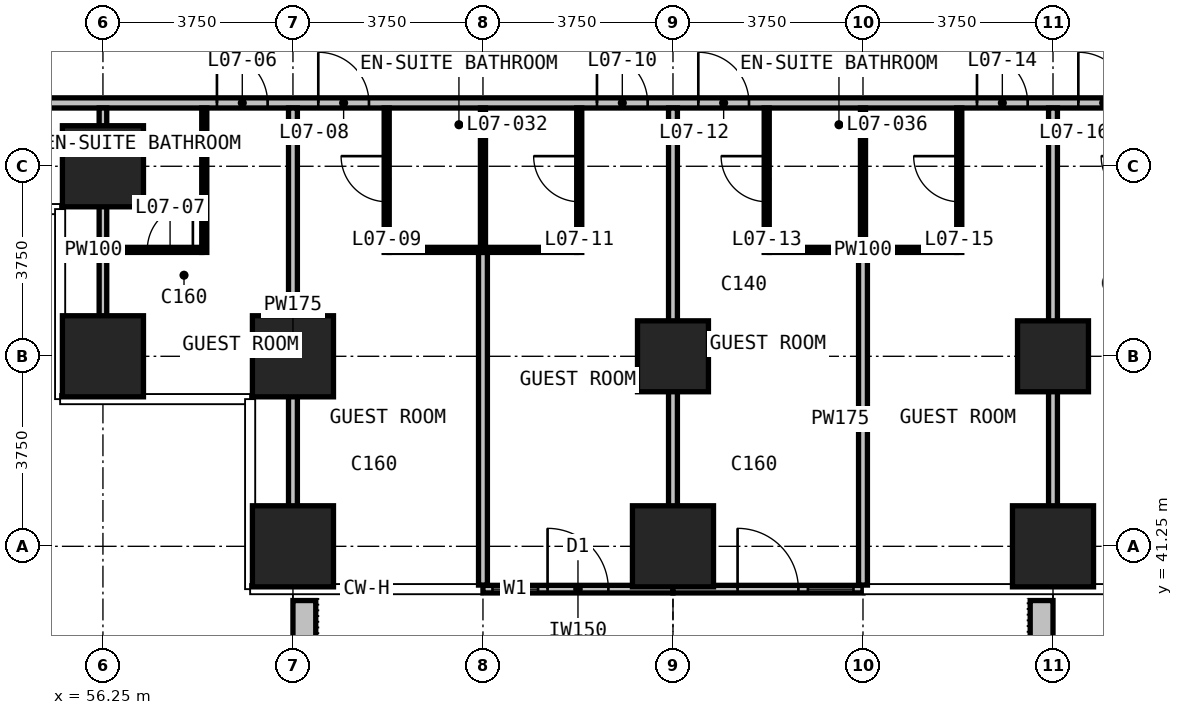
"""IFC4 building model, lengths in metres.
Left out: names, types, materials, properties, quantities, classifications, styles, units other than length and angle.
Written with IfcOpenShell. Run it as: python <this file> out.ifc"""

import sys

from ifc_helpers import new_model, si_unit, direction, frame, frame_2d, origin, origin_2d, place, context, subcontext, project, spatial, rectangle, extrude, element, fill, save


model = new_model("IFC4")
c1 = context("Model", 3, precision=1e-05, world=origin(), true_north=direction((0.0, 1.0)))
c2 = subcontext(c1, "Body", "Model", "MODEL_VIEW")
j1 = project(units=[si_unit("LENGTHUNIT", "METRE"), si_unit("PLANEANGLEUNIT", "RADIAN")], contexts=[c1])
p1 = place(None, origin())
s1 = spatial("IfcSite", under=j1, at=p1, CompositionType="ELEMENT")
p2 = place(p1, origin())
s2 = spatial("IfcBuilding", under=s1, at=p2, CompositionType="ELEMENT")
p3 = place(p2, frame((0.0, 0.0, 42.8)))
s3 = spatial("IfcBuildingStorey", under=s2, at=p3, CompositionType="ELEMENT", Elevation=42.8)
for number, where, z_axis, x_axis in (
    (1, (56.25, 45.0, 0.0), (0.0, 0.0, 1.0), (1.0, 0.0, 0.0)),
    (2, (56.25, 48.75, 0.0), (0.0, 0.0, 1.0), (1.0, 0.0, 0.0)),
    (3, (60.0, 41.25, 0.0), (0.0, 0.0, 1.0), (1.0, 0.0, 0.0)),
    (4, (60.0, 45.0, 0.0), (0.0, 0.0, 1.0), (1.0, 0.0, 0.0)),
    (5, (67.5, 41.25, 0.0), (0.0, 0.0, 1.0), (1.0, 0.0, 0.0)),
):
    element("IfcColumn", number, at=place(p3, frame(where, z_axis=z_axis, x_axis=x_axis)), inside=s3, PredefinedType="COLUMN", context=c2, shape_type="SweptSolid", body=[
        extrude(rectangle(XDim=1.6, YDim=1.6, at=origin_2d()), origin(), (0.0, 0.0, 1.0), 3.3),
    ])
p4 = place(p3, frame((67.5, 45.0, 0.0), z_axis=(0.0, 0.0, 1.0), x_axis=(1.0, 0.0, 0.0)))
e6 = element("IfcColumn", 6, at=p4, inside=s3, PredefinedType="COLUMN", context=c2, shape_type="SweptSolid", body=[
    extrude(rectangle(XDim=1.4, YDim=1.4, at=origin_2d()), origin(), (0.0, 0.0, 1.0), 3.3),
])
p5 = place(p3, frame((75.0, 41.25, 0.0), z_axis=(0.0, 0.0, 1.0), x_axis=(1.0, 0.0, 0.0)))
e7 = element("IfcColumn", 7, at=p5, inside=s3, PredefinedType="COLUMN", context=c2, shape_type="SweptSolid", body=[
    extrude(rectangle(XDim=1.6, YDim=1.6, at=origin_2d()), origin(), (0.0, 0.0, 1.0), 3.3),
])
p6 = place(p3, frame((75.0, 45.0, 0.0), z_axis=(0.0, 0.0, 1.0), x_axis=(1.0, 0.0, 0.0)))
e8 = element("IfcColumn", 8, at=p6, inside=s3, PredefinedType="COLUMN", context=c2, shape_type="SweptSolid", body=[
    extrude(rectangle(XDim=1.4, YDim=1.4, at=origin_2d()), origin(), (0.0, 0.0, 1.0), 3.3),
])
p7 = place(p3, frame((63.75, 40.405, 0.0), z_axis=(0.0, 0.0, 1.0), x_axis=(1.0, 0.0, 0.0)))
e9 = element("IfcWall", 9, at=p7, inside=s3, PredefinedType="SOLIDWALL", context=c2, shape_type="SweptSolid", body=[
    extrude(rectangle(XDim=3.75, YDim=0.15, at=frame_2d((1.875, 0.0))), origin(), (0.0, 0.0, 1.0), 3.0),
])
p8 = place(p7, frame((0.188, 0.0, 0.1)))
e10 = element("IfcOpeningElement", 10, at=p8, cuts=e9, PredefinedType="OPENING", context=c2, shape_type="SweptSolid", body=[
    extrude(rectangle(XDim=0.9, YDim=2.4, at=frame_2d((0.45, 1.2))), frame((0.0, 0.085, 0.0), z_axis=(0.0, -1.0, 0.0), x_axis=(1.0, 0.0, 0.0)), (0.0, 0.0, 1.0), 0.17),
])
p9 = place(p7, frame((1.275, 0.0, 0.0)))
e11 = element("IfcOpeningElement", 11, at=p9, cuts=e9, PredefinedType="OPENING", context=c2, shape_type="SweptSolid", body=[
    extrude(rectangle(XDim=1.2, YDim=2.4, at=frame_2d((0.6, 1.2))), frame((0.0, 0.085, 0.0), z_axis=(0.0, -1.0, 0.0), x_axis=(1.0, 0.0, 0.0)), (0.0, 0.0, 1.0), 0.17),
])
p10 = place(p3, frame((67.5, 40.405, 0.0), z_axis=(0.0, 0.0, 1.0), x_axis=(1.0, 0.0, 0.0)))
e12 = element("IfcWall", 12, at=p10, inside=s3, PredefinedType="SOLIDWALL", context=c2, shape_type="SweptSolid", body=[
    extrude(rectangle(XDim=3.75, YDim=0.15, at=frame_2d((1.875, 0.0))), origin(), (0.0, 0.0, 1.0), 3.0),
])
p11 = place(p10, frame((1.275, 0.0, 0.0)))
e13 = element("IfcOpeningElement", 13, at=p11, cuts=e12, PredefinedType="OPENING", context=c2, shape_type="SweptSolid", body=[
    extrude(rectangle(XDim=1.2, YDim=2.4, at=frame_2d((0.6, 1.2))), frame((0.0, 0.085, 0.0), z_axis=(0.0, -1.0, 0.0), x_axis=(1.0, 0.0, 0.0)), (0.0, 0.0, 1.0), 0.17),
])
p12 = place(p10, frame((2.663, 0.0, 0.1)))
e14 = element("IfcOpeningElement", 14, at=p12, cuts=e12, PredefinedType="OPENING", context=c2, shape_type="SweptSolid", body=[
    extrude(rectangle(XDim=0.9, YDim=2.4, at=frame_2d((0.45, 1.2))), frame((0.0, 0.085, 0.0), z_axis=(0.0, -1.0, 0.0), x_axis=(1.0, 0.0, 0.0)), (0.0, 0.0, 1.0), 0.17),
])
for number, where, z_axis, x_axis in (
    (15, (60.225, 40.18, 0.0), (0.0, 0.0, 1.0), (0.0, -1.0, 0.0)),
    (16, (74.775, 40.18, 0.0), (0.0, 0.0, 1.0), (0.0, -1.0, 0.0)),
):
    element("IfcWall", number, at=place(p3, frame(where, z_axis=z_axis, x_axis=x_axis)), inside=s3, PredefinedType="USERDEFINED", context=c2, shape_type="SweptSolid", body=[
        extrude(rectangle(XDim=2.33, YDim=0.45, at=frame_2d((1.165, 0.0))), origin(), (0.0, 0.0, 1.0), 1.1),
    ])
p13 = place(p3, frame((52.575, 50.0, 0.0), z_axis=(0.0, 0.0, 1.0), x_axis=(1.0, 0.0, 0.0)))
e17 = element("IfcWall", 17, at=p13, inside=s3, PredefinedType="PARTITIONING", context=c2, shape_type="SweptSolid", body=[
    extrude(rectangle(XDim=44.85, YDim=0.2, at=frame_2d((22.425, 0.0))), origin(), (0.0, 0.0, 1.0), 3.0),
])
p14 = place(p13, frame((5.925, 0.0, 0.0)))
e18 = element("IfcOpeningElement", 18, at=p14, cuts=e17, PredefinedType="OPENING", context=c2, shape_type="SweptSolid", body=[
    extrude(rectangle(XDim=1.0, YDim=2.2, at=frame_2d((0.5, 1.1))), frame((0.0, 0.11, 0.0), z_axis=(0.0, -1.0, 0.0), x_axis=(1.0, 0.0, 0.0)), (0.0, 0.0, 1.0), 0.22),
])
p15 = place(p13, frame((7.925, 0.0, 0.0)))
e19 = element("IfcOpeningElement", 19, at=p15, cuts=e17, PredefinedType="OPENING", context=c2, shape_type="SweptSolid", body=[
    extrude(rectangle(XDim=1.0, YDim=2.2, at=frame_2d((0.5, 1.1))), frame((0.0, 0.11, 0.0), z_axis=(0.0, -1.0, 0.0), x_axis=(1.0, 0.0, 0.0)), (0.0, 0.0, 1.0), 0.22),
])
p16 = place(p13, frame((13.425, 0.0, 0.0)))
e20 = element("IfcOpeningElement", 20, at=p16, cuts=e17, PredefinedType="OPENING", context=c2, shape_type="SweptSolid", body=[
    extrude(rectangle(XDim=1.0, YDim=2.2, at=frame_2d((0.5, 1.1))), frame((0.0, 0.11, 0.0), z_axis=(0.0, -1.0, 0.0), x_axis=(1.0, 0.0, 0.0)), (0.0, 0.0, 1.0), 0.22),
])
p17 = place(p13, frame((15.425, 0.0, 0.0)))
e21 = element("IfcOpeningElement", 21, at=p17, cuts=e17, PredefinedType="OPENING", context=c2, shape_type="SweptSolid", body=[
    extrude(rectangle(XDim=1.0, YDim=2.2, at=frame_2d((0.5, 1.1))), frame((0.0, 0.11, 0.0), z_axis=(0.0, -1.0, 0.0), x_axis=(1.0, 0.0, 0.0)), (0.0, 0.0, 1.0), 0.22),
])
p18 = place(p13, frame((20.925, 0.0, 0.0)))
e22 = element("IfcOpeningElement", 22, at=p18, cuts=e17, PredefinedType="OPENING", context=c2, shape_type="SweptSolid", body=[
    extrude(rectangle(XDim=1.0, YDim=2.2, at=frame_2d((0.5, 1.1))), frame((0.0, 0.11, 0.0), z_axis=(0.0, -1.0, 0.0), x_axis=(1.0, 0.0, 0.0)), (0.0, 0.0, 1.0), 0.22),
])
p19 = place(p13, frame((22.925, 0.0, 0.0)))
e23 = element("IfcOpeningElement", 23, at=p19, cuts=e17, PredefinedType="OPENING", context=c2, shape_type="SweptSolid", body=[
    extrude(rectangle(XDim=1.0, YDim=2.2, at=frame_2d((0.5, 1.1))), frame((0.0, 0.11, 0.0), z_axis=(0.0, -1.0, 0.0), x_axis=(1.0, 0.0, 0.0)), (0.0, 0.0, 1.0), 0.22),
])
p20 = place(p13, frame((28.425, 0.0, 0.0)))
e24 = element("IfcOpeningElement", 24, at=p20, cuts=e17, PredefinedType="OPENING", context=c2, shape_type="SweptSolid", body=[
    extrude(rectangle(XDim=1.0, YDim=2.2, at=frame_2d((0.5, 1.1))), frame((0.0, 0.11, 0.0), z_axis=(0.0, -1.0, 0.0), x_axis=(1.0, 0.0, 0.0)), (0.0, 0.0, 1.0), 0.22),
])
p21 = place(p13, frame((30.425, 0.0, 0.0)))
e25 = element("IfcOpeningElement", 25, at=p21, cuts=e17, PredefinedType="OPENING", context=c2, shape_type="SweptSolid", body=[
    extrude(rectangle(XDim=1.0, YDim=2.2, at=frame_2d((0.5, 1.1))), frame((0.0, 0.11, 0.0), z_axis=(0.0, -1.0, 0.0), x_axis=(1.0, 0.0, 0.0)), (0.0, 0.0, 1.0), 0.22),
])
p22 = place(p13, frame((35.925, 0.0, 0.0)))
e26 = element("IfcOpeningElement", 26, at=p22, cuts=e17, PredefinedType="OPENING", context=c2, shape_type="SweptSolid", body=[
    extrude(rectangle(XDim=1.0, YDim=2.2, at=frame_2d((0.5, 1.1))), frame((0.0, 0.11, 0.0), z_axis=(0.0, -1.0, 0.0), x_axis=(1.0, 0.0, 0.0)), (0.0, 0.0, 1.0), 0.22),
])
p23 = place(p13, frame((37.925, 0.0, 0.0)))
e27 = element("IfcOpeningElement", 27, at=p23, cuts=e17, PredefinedType="OPENING", context=c2, shape_type="SweptSolid", body=[
    extrude(rectangle(XDim=1.0, YDim=2.2, at=frame_2d((0.5, 1.1))), frame((0.0, 0.11, 0.0), z_axis=(0.0, -1.0, 0.0), x_axis=(1.0, 0.0, 0.0)), (0.0, 0.0, 1.0), 0.22),
])
p24 = place(p13, frame((1.4, 0.0, 0.0)))
e28 = element("IfcOpeningElement", 28, at=p24, cuts=e17, PredefinedType="OPENING", context=c2, shape_type="SweptSolid", body=[
    extrude(rectangle(XDim=0.9, YDim=2.2, at=frame_2d((0.45, 1.1))), frame((0.0, 0.11, 0.0), z_axis=(0.0, -1.0, 0.0), x_axis=(1.0, 0.0, 0.0)), (0.0, 0.0, 1.0), 0.22),
])
p25 = place(p13, frame((42.575, 0.0, 0.0)))
e29 = element("IfcOpeningElement", 29, at=p25, cuts=e17, PredefinedType="OPENING", context=c2, shape_type="SweptSolid", body=[
    extrude(rectangle(XDim=0.9, YDim=2.2, at=frame_2d((0.45, 1.1))), frame((0.0, 0.11, 0.0), z_axis=(0.0, -1.0, 0.0), x_axis=(1.0, 0.0, 0.0)), (0.0, 0.0, 1.0), 0.22),
])
p26 = place(p3, frame((60.0, 40.485, 0.0), z_axis=(0.0, 0.0, 1.0), x_axis=(0.0, 1.0, 0.0)))
e30 = element("IfcWall", 30, at=p26, inside=s3, PredefinedType="PARTITIONING", context=c2, shape_type="SweptSolid", body=[
    extrude(rectangle(XDim=9.415, YDim=0.175, at=frame_2d((4.708, 0.0))), origin(), (0.0, 0.0, 1.0), 3.0),
])
p27 = place(p3, frame((63.75, 40.485, 0.0), z_axis=(0.0, 0.0, 1.0), x_axis=(0.0, 1.0, 0.0)))
e31 = element("IfcWall", 31, at=p27, inside=s3, PredefinedType="PARTITIONING", context=c2, shape_type="SweptSolid", body=[
    extrude(rectangle(XDim=6.565, YDim=0.175, at=frame_2d((3.282, 0.0))), origin(), (0.0, 0.0, 1.0), 3.0),
])
p28 = place(p3, frame((67.5, 40.485, 0.0), z_axis=(0.0, 0.0, 1.0), x_axis=(0.0, 1.0, 0.0)))
e32 = element("IfcWall", 32, at=p28, inside=s3, PredefinedType="PARTITIONING", context=c2, shape_type="SweptSolid", body=[
    extrude(rectangle(XDim=9.415, YDim=0.175, at=frame_2d((4.708, 0.0))), origin(), (0.0, 0.0, 1.0), 3.0),
])
p29 = place(p3, frame((71.25, 40.485, 0.0), z_axis=(0.0, 0.0, 1.0), x_axis=(0.0, 1.0, 0.0)))
e33 = element("IfcWall", 33, at=p29, inside=s3, PredefinedType="PARTITIONING", context=c2, shape_type="SweptSolid", body=[
    extrude(rectangle(XDim=6.565, YDim=0.175, at=frame_2d((3.282, 0.0))), origin(), (0.0, 0.0, 1.0), 3.0),
])
p30 = place(p3, frame((75.0, 40.485, 0.0), z_axis=(0.0, 0.0, 1.0), x_axis=(0.0, 1.0, 0.0)))
e34 = element("IfcWall", 34, at=p30, inside=s3, PredefinedType="PARTITIONING", context=c2, shape_type="SweptSolid", body=[
    extrude(rectangle(XDim=9.415, YDim=0.175, at=frame_2d((4.708, 0.0))), origin(), (0.0, 0.0, 1.0), 3.0),
])
p31 = place(p3, frame((56.25, 44.235, 0.0), z_axis=(0.0, 0.0, 1.0), x_axis=(0.0, 1.0, 0.0)))
e35 = element("IfcWall", 35, at=p31, inside=s3, PredefinedType="PARTITIONING", context=c2, shape_type="SweptSolid", body=[
    extrude(rectangle(XDim=5.665, YDim=0.15, at=frame_2d((2.833, 0.0))), origin(), (0.0, 0.0, 1.0), 3.0),
])
p32 = place(p3, frame((56.325, 47.1, 0.0), z_axis=(0.0, 0.0, 1.0), x_axis=(1.0, 0.0, 0.0)))
e36 = element("IfcWall", 36, at=p32, inside=s3, PredefinedType="PARTITIONING", context=c2, shape_type="SweptSolid", body=[
    extrude(rectangle(XDim=1.875, YDim=0.1, at=frame_2d((0.938, 0.0))), origin(), (0.0, 0.0, 1.0), 3.0),
])
p33 = place(p32, frame((0.8, 0.0, 0.0)))
e37 = element("IfcOpeningElement", 37, at=p33, cuts=e36, PredefinedType="OPENING", context=c2, shape_type="SweptSolid", body=[
    extrude(rectangle(XDim=0.9, YDim=2.2, at=frame_2d((0.45, 1.1))), frame((0.0, 0.06, 0.0), z_axis=(0.0, -1.0, 0.0), x_axis=(1.0, 0.0, 0.0)), (0.0, 0.0, 1.0), 0.12),
])
for number, where, z_axis, x_axis in (
    (38, (61.9, 47.1, 0.0), (0.0, 0.0, 1.0), (1.0, 0.0, 0.0)),
    (39, (69.4, 47.1, 0.0), (0.0, 0.0, 1.0), (1.0, 0.0, 0.0)),
):
    element("IfcWall", number, at=place(p3, frame(where, z_axis=z_axis, x_axis=x_axis)), inside=s3, PredefinedType="PARTITIONING", context=c2, shape_type="SweptSolid", body=[
        extrude(rectangle(XDim=3.7, YDim=0.1, at=frame_2d((1.85, 0.0))), origin(), (0.0, 0.0, 1.0), 3.0),
    ])
p34 = place(p3, frame((58.25, 47.05, 0.0), z_axis=(0.0, 0.0, 1.0), x_axis=(0.0, 1.0, 0.0)))
e40 = element("IfcWall", 40, at=p34, inside=s3, PredefinedType="PARTITIONING", context=c2, shape_type="SweptSolid", body=[
    extrude(rectangle(XDim=2.85, YDim=0.1, at=frame_2d((1.425, 0.0))), origin(), (0.0, 0.0, 1.0), 3.0),
])
p35 = place(p3, frame((61.85, 47.05, 0.0), z_axis=(0.0, 0.0, 1.0), x_axis=(0.0, 1.0, 0.0)))
e41 = element("IfcWall", 41, at=p35, inside=s3, PredefinedType="PARTITIONING", context=c2, shape_type="SweptSolid", body=[
    extrude(rectangle(XDim=2.85, YDim=0.1, at=frame_2d((1.425, 0.0))), origin(), (0.0, 0.0, 1.0), 3.0),
])
p36 = place(p35, frame((1.0, 0.0, 0.0)))
e42 = element("IfcOpeningElement", 42, at=p36, cuts=e41, PredefinedType="OPENING", context=c2, shape_type="SweptSolid", body=[
    extrude(rectangle(XDim=0.9, YDim=2.2, at=frame_2d((0.45, 1.1))), frame((0.0, 0.06, 0.0), z_axis=(0.0, -1.0, 0.0), x_axis=(1.0, 0.0, 0.0)), (0.0, 0.0, 1.0), 0.12),
])
p37 = place(p3, frame((63.75, 47.15, 0.0), z_axis=(0.0, 0.0, 1.0), x_axis=(0.0, 1.0, 0.0)))
e43 = element("IfcWall", 43, at=p37, inside=s3, PredefinedType="PARTITIONING", context=c2, shape_type="SweptSolid", body=[
    extrude(rectangle(XDim=2.75, YDim=0.1, at=frame_2d((1.375, 0.0))), origin(), (0.0, 0.0, 1.0), 3.0),
])
p38 = place(p3, frame((65.65, 47.05, 0.0), z_axis=(0.0, 0.0, 1.0), x_axis=(0.0, 1.0, 0.0)))
e44 = element("IfcWall", 44, at=p38, inside=s3, PredefinedType="PARTITIONING", context=c2, shape_type="SweptSolid", body=[
    extrude(rectangle(XDim=2.85, YDim=0.1, at=frame_2d((1.425, 0.0))), origin(), (0.0, 0.0, 1.0), 3.0),
])
p39 = place(p38, frame((1.0, 0.0, 0.0)))
e45 = element("IfcOpeningElement", 45, at=p39, cuts=e44, PredefinedType="OPENING", context=c2, shape_type="SweptSolid", body=[
    extrude(rectangle(XDim=0.9, YDim=2.2, at=frame_2d((0.45, 1.1))), frame((0.0, 0.06, 0.0), z_axis=(0.0, -1.0, 0.0), x_axis=(1.0, 0.0, 0.0)), (0.0, 0.0, 1.0), 0.12),
])
p40 = place(p3, frame((69.35, 47.05, 0.0), z_axis=(0.0, 0.0, 1.0), x_axis=(0.0, 1.0, 0.0)))
e46 = element("IfcWall", 46, at=p40, inside=s3, PredefinedType="PARTITIONING", context=c2, shape_type="SweptSolid", body=[
    extrude(rectangle(XDim=2.85, YDim=0.1, at=frame_2d((1.425, 0.0))), origin(), (0.0, 0.0, 1.0), 3.0),
])
p41 = place(p40, frame((1.0, 0.0, 0.0)))
e47 = element("IfcOpeningElement", 47, at=p41, cuts=e46, PredefinedType="OPENING", context=c2, shape_type="SweptSolid", body=[
    extrude(rectangle(XDim=0.9, YDim=2.2, at=frame_2d((0.45, 1.1))), frame((0.0, 0.06, 0.0), z_axis=(0.0, -1.0, 0.0), x_axis=(1.0, 0.0, 0.0)), (0.0, 0.0, 1.0), 0.12),
])
p42 = place(p3, frame((71.25, 47.15, 0.0), z_axis=(0.0, 0.0, 1.0), x_axis=(0.0, 1.0, 0.0)))
e48 = element("IfcWall", 48, at=p42, inside=s3, PredefinedType="PARTITIONING", context=c2, shape_type="SweptSolid", body=[
    extrude(rectangle(XDim=2.75, YDim=0.1, at=frame_2d((1.375, 0.0))), origin(), (0.0, 0.0, 1.0), 3.0),
])
p43 = place(p3, frame((73.15, 47.05, 0.0), z_axis=(0.0, 0.0, 1.0), x_axis=(0.0, 1.0, 0.0)))
e49 = element("IfcWall", 49, at=p43, inside=s3, PredefinedType="PARTITIONING", context=c2, shape_type="SweptSolid", body=[
    extrude(rectangle(XDim=2.85, YDim=0.1, at=frame_2d((1.425, 0.0))), origin(), (0.0, 0.0, 1.0), 3.0),
])
p44 = place(p43, frame((1.0, 0.0, 0.0)))
e50 = element("IfcOpeningElement", 50, at=p44, cuts=e49, PredefinedType="OPENING", context=c2, shape_type="SweptSolid", body=[
    extrude(rectangle(XDim=0.9, YDim=2.2, at=frame_2d((0.45, 1.1))), frame((0.0, 0.06, 0.0), z_axis=(0.0, -1.0, 0.0), x_axis=(1.0, 0.0, 0.0)), (0.0, 0.0, 1.0), 0.12),
])
p45 = place(p8, origin())
e51 = element("IfcWindow", 51, at=p45, inside=s3, PartitioningType="SINGLE_PANEL", PredefinedType="WINDOW", context=c2, shape_type="SweptSolid", body=[
    extrude(rectangle(XDim=0.9, YDim=2.4, at=frame_2d((0.45, 1.2))), frame((0.0, 0.03, 0.0), z_axis=(0.0, -1.0, 0.0), x_axis=(1.0, 0.0, 0.0)), (0.0, 0.0, 1.0), 0.06),
])
fill(e10, e51)
p46 = place(p9, origin())
e52 = element("IfcDoor", 52, at=p46, inside=s3, OperationType="SINGLE_SWING_LEFT", PredefinedType="DOOR", context=c2, shape_type="SweptSolid", body=[
    extrude(rectangle(XDim=1.2, YDim=2.4, at=frame_2d((0.6, 1.2))), frame((0.0, 0.025, 0.0), z_axis=(0.0, -1.0, 0.0), x_axis=(1.0, 0.0, 0.0)), (0.0, 0.0, 1.0), 0.05),
])
fill(e11, e52)
p47 = place(p11, origin())
e53 = element("IfcDoor", 53, at=p47, inside=s3, OperationType="SINGLE_SWING_LEFT", PredefinedType="DOOR", context=c2, shape_type="SweptSolid", body=[
    extrude(rectangle(XDim=1.2, YDim=2.4, at=frame_2d((0.6, 1.2))), frame((0.0, 0.025, 0.0), z_axis=(0.0, -1.0, 0.0), x_axis=(1.0, 0.0, 0.0)), (0.0, 0.0, 1.0), 0.05),
])
fill(e13, e53)
p48 = place(p12, origin())
e54 = element("IfcWindow", 54, at=p48, inside=s3, PartitioningType="SINGLE_PANEL", PredefinedType="WINDOW", context=c2, shape_type="SweptSolid", body=[
    extrude(rectangle(XDim=0.9, YDim=2.4, at=frame_2d((0.45, 1.2))), frame((0.0, 0.03, 0.0), z_axis=(0.0, -1.0, 0.0), x_axis=(1.0, 0.0, 0.0)), (0.0, 0.0, 1.0), 0.06),
])
fill(e14, e54)
p49 = place(p14, origin())
e55 = element("IfcDoor", 55, at=p49, inside=s3, OperationType="SINGLE_SWING_LEFT", PredefinedType="DOOR", context=c2, shape_type="SweptSolid", body=[
    extrude(rectangle(XDim=1.0, YDim=2.2, at=frame_2d((0.5, 1.1))), frame((0.0, 0.025, 0.0), z_axis=(0.0, -1.0, 0.0), x_axis=(1.0, 0.0, 0.0)), (0.0, 0.0, 1.0), 0.05),
])
fill(e18, e55)
p50 = place(p33, origin())
e56 = element("IfcDoor", 56, at=p50, inside=s3, OperationType="SINGLE_SWING_RIGHT", PredefinedType="DOOR", context=c2, shape_type="SweptSolid", body=[
    extrude(rectangle(XDim=0.9, YDim=2.2, at=frame_2d((0.45, 1.1))), frame((0.0, 0.025, 0.0), z_axis=(0.0, -1.0, 0.0), x_axis=(1.0, 0.0, 0.0)), (0.0, 0.0, 1.0), 0.05),
])
fill(e37, e56)
p51 = place(p15, origin())
e57 = element("IfcDoor", 57, at=p51, inside=s3, OperationType="SINGLE_SWING_LEFT", PredefinedType="DOOR", context=c2, shape_type="SweptSolid", body=[
    extrude(rectangle(XDim=1.0, YDim=2.2, at=frame_2d((0.5, 1.1))), frame((0.0, 0.025, 0.0), z_axis=(0.0, -1.0, 0.0), x_axis=(1.0, 0.0, 0.0)), (0.0, 0.0, 1.0), 0.05),
])
fill(e19, e57)
p52 = place(p36, origin())
e58 = element("IfcDoor", 58, at=p52, inside=s3, OperationType="SINGLE_SWING_RIGHT", PredefinedType="DOOR", context=c2, shape_type="SweptSolid", body=[
    extrude(rectangle(XDim=0.9, YDim=2.2, at=frame_2d((0.45, 1.1))), frame((0.0, 0.025, 0.0), z_axis=(0.0, -1.0, 0.0), x_axis=(1.0, 0.0, 0.0)), (0.0, 0.0, 1.0), 0.05),
])
fill(e42, e58)
p53 = place(p16, origin())
e59 = element("IfcDoor", 59, at=p53, inside=s3, OperationType="SINGLE_SWING_LEFT", PredefinedType="DOOR", context=c2, shape_type="SweptSolid", body=[
    extrude(rectangle(XDim=1.0, YDim=2.2, at=frame_2d((0.5, 1.1))), frame((0.0, 0.025, 0.0), z_axis=(0.0, -1.0, 0.0), x_axis=(1.0, 0.0, 0.0)), (0.0, 0.0, 1.0), 0.05),
])
fill(e20, e59)
p54 = place(p39, origin())
e60 = element("IfcDoor", 60, at=p54, inside=s3, OperationType="SINGLE_SWING_RIGHT", PredefinedType="DOOR", context=c2, shape_type="SweptSolid", body=[
    extrude(rectangle(XDim=0.9, YDim=2.2, at=frame_2d((0.45, 1.1))), frame((0.0, 0.025, 0.0), z_axis=(0.0, -1.0, 0.0), x_axis=(1.0, 0.0, 0.0)), (0.0, 0.0, 1.0), 0.05),
])
fill(e45, e60)
p55 = place(p17, origin())
e61 = element("IfcDoor", 61, at=p55, inside=s3, OperationType="SINGLE_SWING_LEFT", PredefinedType="DOOR", context=c2, shape_type="SweptSolid", body=[
    extrude(rectangle(XDim=1.0, YDim=2.2, at=frame_2d((0.5, 1.1))), frame((0.0, 0.025, 0.0), z_axis=(0.0, -1.0, 0.0), x_axis=(1.0, 0.0, 0.0)), (0.0, 0.0, 1.0), 0.05),
])
fill(e21, e61)
p56 = place(p41, origin())
e62 = element("IfcDoor", 62, at=p56, inside=s3, OperationType="SINGLE_SWING_RIGHT", PredefinedType="DOOR", context=c2, shape_type="SweptSolid", body=[
    extrude(rectangle(XDim=0.9, YDim=2.2, at=frame_2d((0.45, 1.1))), frame((0.0, 0.025, 0.0), z_axis=(0.0, -1.0, 0.0), x_axis=(1.0, 0.0, 0.0)), (0.0, 0.0, 1.0), 0.05),
])
fill(e47, e62)
p57 = place(p18, origin())
e63 = element("IfcDoor", 63, at=p57, inside=s3, OperationType="SINGLE_SWING_LEFT", PredefinedType="DOOR", context=c2, shape_type="SweptSolid", body=[
    extrude(rectangle(XDim=1.0, YDim=2.2, at=frame_2d((0.5, 1.1))), frame((0.0, 0.025, 0.0), z_axis=(0.0, -1.0, 0.0), x_axis=(1.0, 0.0, 0.0)), (0.0, 0.0, 1.0), 0.05),
])
fill(e22, e63)
p58 = place(p44, origin())
e64 = element("IfcDoor", 64, at=p58, inside=s3, OperationType="SINGLE_SWING_RIGHT", PredefinedType="DOOR", context=c2, shape_type="SweptSolid", body=[
    extrude(rectangle(XDim=0.9, YDim=2.2, at=frame_2d((0.45, 1.1))), frame((0.0, 0.025, 0.0), z_axis=(0.0, -1.0, 0.0), x_axis=(1.0, 0.0, 0.0)), (0.0, 0.0, 1.0), 0.05),
])
fill(e50, e64)
p59 = place(p19, origin())
e65 = element("IfcDoor", 65, at=p59, inside=s3, OperationType="SINGLE_SWING_LEFT", PredefinedType="DOOR", context=c2, shape_type="SweptSolid", body=[
    extrude(rectangle(XDim=1.0, YDim=2.2, at=frame_2d((0.5, 1.1))), frame((0.0, 0.025, 0.0), z_axis=(0.0, -1.0, 0.0), x_axis=(1.0, 0.0, 0.0)), (0.0, 0.0, 1.0), 0.05),
])
fill(e23, e65)
save(model, sys.argv[1])
